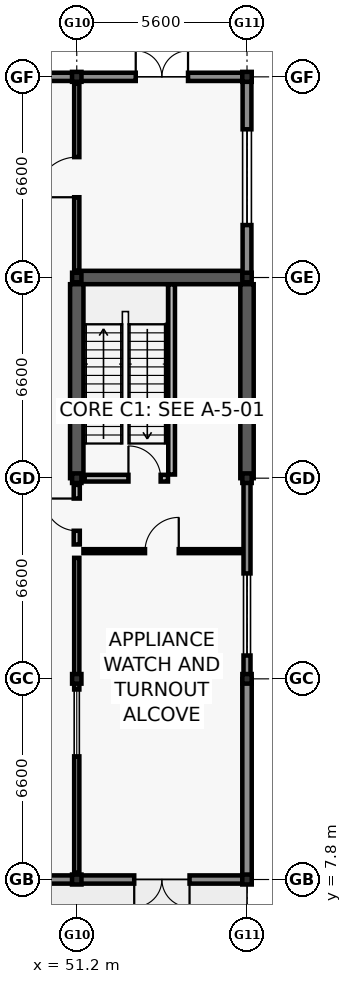
"""IFC4 building model, lengths in metres.
Left out: names, types, materials, properties, quantities, classifications, styles, units other than length and angle.
Written with IfcOpenShell. Run it as: python <this file> out.ifc"""

import sys

from ifc_helpers import new_model, si_unit, direction, frame, frame_2d, origin, origin_2d, place, context, subcontext, project, spatial, rectangle, i_section, extrude, element, fill, save


model = new_model("IFC4")
c1 = context("Model", 3, precision=1e-05, world=origin(), true_north=direction((0.0, 1.0)))
c2 = subcontext(c1, "Body", "Model", "MODEL_VIEW")
j1 = project(units=[si_unit("LENGTHUNIT", "METRE"), si_unit("PLANEANGLEUNIT", "RADIAN")], contexts=[c1])
p1 = place(None, origin())
s1 = spatial("IfcSite", under=j1, at=p1, CompositionType="ELEMENT")
p2 = place(p1, origin())
s2 = spatial("IfcBuilding", under=s1, at=p2, CompositionType="ELEMENT")
p3 = place(p2, origin())
s3 = spatial("IfcBuildingStorey", under=s2, at=p3, CompositionType="ELEMENT", Elevation=0.0)
p4 = place(p3, frame((51.2, 7.8, 0.0), z_axis=(0.0, 0.0, 1.0), x_axis=(1.0, 0.0, 0.0)))
e1 = element("IfcColumn", 1, at=p4, inside=s3, PredefinedType="COLUMN", context=c2, shape_type="SweptSolid", body=[
    extrude(i_section(OverallWidth=0.311, OverallDepth=0.327, WebThickness=0.016, FlangeThickness=0.025, FilletRadius=0.017, at=origin_2d()), origin(), (0.0, 0.0, 1.0), 5.4),
])
for number, where, z_axis, x_axis in (
    (2, (51.2, 14.4, 0.0), (0.0, 0.0, 1.0), (1.0, 0.0, 0.0)),
    (3, (51.2, 21.0, 0.0), (0.0, 0.0, 1.0), (1.0, 0.0, 0.0)),
    (4, (51.2, 27.6, 0.0), (0.0, 0.0, 1.0), (1.0, 0.0, 0.0)),
):
    element("IfcColumn", number, at=place(p3, frame(where, z_axis=z_axis, x_axis=x_axis)), inside=s3, PredefinedType="COLUMN", context=c2, shape_type="SweptSolid", body=[
        extrude(i_section(OverallWidth=0.307, OverallDepth=0.315, WebThickness=0.012, FlangeThickness=0.019, FilletRadius=0.017, at=origin_2d()), origin(), (0.0, 0.0, 1.0), 5.4),
    ])
for number, where, z_axis, x_axis in (
    (5, (51.2, 34.2, 0.0), (0.0, 0.0, 1.0), (1.0, 0.0, 0.0)),
    (6, (56.8, 7.8, 0.0), (0.0, 0.0, 1.0), (1.0, 0.0, 0.0)),
):
    element("IfcColumn", number, at=place(p3, frame(where, z_axis=z_axis, x_axis=x_axis)), inside=s3, PredefinedType="COLUMN", context=c2, shape_type="SweptSolid", body=[
        extrude(i_section(OverallWidth=0.311, OverallDepth=0.327, WebThickness=0.016, FlangeThickness=0.025, FilletRadius=0.017, at=origin_2d()), origin(), (0.0, 0.0, 1.0), 5.4),
    ])
for number, where, z_axis, x_axis in (
    (7, (56.8, 14.4, 0.0), (0.0, 0.0, 1.0), (1.0, 0.0, 0.0)),
    (8, (56.8, 21.0, 0.0), (0.0, 0.0, 1.0), (1.0, 0.0, 0.0)),
    (9, (56.8, 27.6, 0.0), (0.0, 0.0, 1.0), (1.0, 0.0, 0.0)),
):
    element("IfcColumn", number, at=place(p3, frame(where, z_axis=z_axis, x_axis=x_axis)), inside=s3, PredefinedType="COLUMN", context=c2, shape_type="SweptSolid", body=[
        extrude(i_section(OverallWidth=0.307, OverallDepth=0.315, WebThickness=0.012, FlangeThickness=0.019, FilletRadius=0.017, at=origin_2d()), origin(), (0.0, 0.0, 1.0), 5.4),
    ])
p5 = place(p3, frame((56.8, 34.2, 0.0), z_axis=(0.0, 0.0, 1.0), x_axis=(1.0, 0.0, 0.0)))
e10 = element("IfcColumn", 10, at=p5, inside=s3, PredefinedType="COLUMN", context=c2, shape_type="SweptSolid", body=[
    extrude(i_section(OverallWidth=0.311, OverallDepth=0.327, WebThickness=0.016, FlangeThickness=0.025, FilletRadius=0.017, at=origin_2d()), origin(), (0.0, 0.0, 1.0), 5.4),
])
p6 = place(p3, frame((51.2, 27.6, 0.0), z_axis=(0.0, 0.0, 1.0), x_axis=(1.0, 0.0, 0.0)))
e11 = element("IfcWall", 11, at=p6, inside=s3, PredefinedType="SHEAR", context=c2, shape_type="SweptSolid", body=[
    extrude(rectangle(XDim=5.6, YDim=0.44, at=frame_2d((2.8, 0.0))), origin(), (0.0, 0.0, 1.0), 5.16),
])
for number, where, z_axis, x_axis in (
    (12, (51.2, 21.0, 0.0), (0.0, 0.0, 1.0), (0.0, 1.0, 0.0)),
    (13, (56.8, 21.0, 0.0), (0.0, 0.0, 1.0), (0.0, 1.0, 0.0)),
):
    element("IfcWall", number, at=place(p3, frame(where, z_axis=z_axis, x_axis=x_axis)), inside=s3, PredefinedType="SHEAR", context=c2, shape_type="SweptSolid", body=[
        extrude(rectangle(XDim=6.38, YDim=0.44, at=frame_2d((3.19, 0.0))), origin(), (0.0, 0.0, 1.0), 5.16),
    ])
p7 = place(p3, frame((51.195, 7.8, 0.0), z_axis=(0.0, 0.0, 1.0), x_axis=(-1.0, 0.0, 0.0)))
e14 = element("IfcWall", 14, at=p7, inside=s3, PredefinedType="SOLIDWALL", context=c2, shape_type="SweptSolid", body=[
    extrude(rectangle(XDim=5.59, YDim=0.27, at=frame_2d((2.795, 0.0))), origin(), (0.0, 0.0, 1.0), 4.3),
])
p8 = place(p7, frame((0.92, 0.0, 0.0)))
e15 = element("IfcOpeningElement", 15, at=p8, cuts=e14, PredefinedType="OPENING", context=c2, shape_type="SweptSolid", body=[
    extrude(rectangle(XDim=3.75, YDim=4.15, at=frame_2d((1.875, 2.075))), frame((0.0, 0.145, 0.0), z_axis=(0.0, -1.0, 0.0), x_axis=(1.0, 0.0, 0.0)), (0.0, 0.0, 1.0), 0.29),
])
p9 = place(p3, frame((56.795, 7.8, 0.0), z_axis=(0.0, 0.0, 1.0), x_axis=(-1.0, 0.0, 0.0)))
e16 = element("IfcWall", 16, at=p9, inside=s3, PredefinedType="SOLIDWALL", context=c2, shape_type="SweptSolid", body=[
    extrude(rectangle(XDim=5.59, YDim=0.27, at=frame_2d((2.795, 0.0))), origin(), (0.0, 0.0, 1.0), 4.52),
])
p10 = place(p9, frame((1.885, 0.0, 0.0)))
e17 = element("IfcOpeningElement", 17, at=p10, cuts=e16, PredefinedType="OPENING", context=c2, shape_type="SweptSolid", body=[
    extrude(rectangle(XDim=1.82, YDim=2.2, at=frame_2d((0.91, 1.1))), frame((0.0, 0.145, 0.0), z_axis=(0.0, -1.0, 0.0), x_axis=(1.0, 0.0, 0.0)), (0.0, 0.0, 1.0), 0.29),
])
p11 = place(p3, frame((45.605, 34.2, 0.0), z_axis=(0.0, 0.0, 1.0), x_axis=(1.0, 0.0, 0.0)))
e18 = element("IfcWall", 18, at=p11, inside=s3, PredefinedType="SOLIDWALL", context=c2, shape_type="SweptSolid", body=[
    extrude(rectangle(XDim=5.59, YDim=0.27, at=frame_2d((2.795, 0.0))), origin(), (0.0, 0.0, 1.0), 4.3),
])
p12 = place(p3, frame((51.205, 34.2, 0.0), z_axis=(0.0, 0.0, 1.0), x_axis=(1.0, 0.0, 0.0)))
e19 = element("IfcWall", 19, at=p12, inside=s3, PredefinedType="SOLIDWALL", context=c2, shape_type="SweptSolid", body=[
    extrude(rectangle(XDim=5.59, YDim=0.27, at=frame_2d((2.795, 0.0))), origin(), (0.0, 0.0, 1.0), 4.52),
])
p13 = place(p12, frame((1.935, 0.0, 0.0)))
e20 = element("IfcOpeningElement", 20, at=p13, cuts=e19, PredefinedType="OPENING", context=c2, shape_type="SweptSolid", body=[
    extrude(rectangle(XDim=1.72, YDim=2.2, at=frame_2d((0.86, 1.1))), frame((0.0, 0.145, 0.0), z_axis=(0.0, -1.0, 0.0), x_axis=(1.0, 0.0, 0.0)), (0.0, 0.0, 1.0), 0.29),
])
p14 = place(p3, frame((56.8, 14.395, 0.0), z_axis=(0.0, 0.0, 1.0), x_axis=(0.0, -1.0, 0.0)))
e21 = element("IfcWall", 21, at=p14, inside=s3, PredefinedType="SOLIDWALL", context=c2, shape_type="SweptSolid", body=[
    extrude(rectangle(XDim=6.59, YDim=0.31, at=frame_2d((3.295, 0.0))), origin(), (0.0, 0.0, 1.0), 4.52),
])
p15 = place(p3, frame((56.8, 20.995, 0.0), z_axis=(0.0, 0.0, 1.0), x_axis=(0.0, -1.0, 0.0)))
e22 = element("IfcWall", 22, at=p15, inside=s3, PredefinedType="SOLIDWALL", context=c2, shape_type="SweptSolid", body=[
    extrude(rectangle(XDim=6.59, YDim=0.23, at=frame_2d((3.295, 0.0))), origin(), (0.0, 0.0, 1.0), 4.52),
])
p16 = place(p15, frame((3.127, 0.0, 0.8)))
e23 = element("IfcOpeningElement", 23, at=p16, cuts=e22, PredefinedType="OPENING", context=c2, shape_type="SweptSolid", body=[
    extrude(rectangle(XDim=2.7, YDim=2.1, at=frame_2d((1.35, 1.05))), frame((0.0, 0.125, 0.0), z_axis=(0.0, -1.0, 0.0), x_axis=(1.0, 0.0, 0.0)), (0.0, 0.0, 1.0), 0.25),
])
p17 = place(p3, frame((56.8, 34.195, 0.0), z_axis=(0.0, 0.0, 1.0), x_axis=(0.0, -1.0, 0.0)))
e24 = element("IfcWall", 24, at=p17, inside=s3, PredefinedType="SOLIDWALL", context=c2, shape_type="SweptSolid", body=[
    extrude(rectangle(XDim=6.59, YDim=0.29, at=frame_2d((3.295, 0.0))), origin(), (0.0, 0.0, 1.0), 4.52),
])
p18 = place(p17, frame((1.72, 0.0, 0.8)))
e25 = element("IfcOpeningElement", 25, at=p18, cuts=e24, PredefinedType="OPENING", context=c2, shape_type="SweptSolid", body=[
    extrude(rectangle(XDim=3.15, YDim=2.1, at=frame_2d((1.575, 1.05))), frame((0.0, 0.155, 0.0), z_axis=(0.0, -1.0, 0.0), x_axis=(1.0, 0.0, 0.0)), (0.0, 0.0, 1.0), 0.31),
])
p19 = place(p3, frame((54.32, 21.12, 0.0), z_axis=(0.0, 0.0, 1.0), x_axis=(0.0, 1.0, 0.0)))
e26 = element("IfcWall", 26, at=p19, inside=s3, PredefinedType="SOLIDWALL", context=c2, shape_type="SweptSolid", body=[
    extrude(rectangle(XDim=6.255, YDim=0.22, at=frame_2d((3.127, 0.0))), origin(), (0.0, 0.0, 1.0), 5.16),
])
p20 = place(p3, frame((51.46, 21.0, 0.0), z_axis=(0.0, 0.0, 1.0), x_axis=(1.0, 0.0, 0.0)))
e27 = element("IfcWall", 27, at=p20, inside=s3, PredefinedType="SOLIDWALL", context=c2, shape_type="SweptSolid", body=[
    extrude(rectangle(XDim=2.74, YDim=0.22, at=frame_2d((1.37, 0.0))), origin(), (0.0, 0.0, 1.0), 4.52),
])
p21 = place(p20, frame((1.44, 0.0, 0.0)))
e28 = element("IfcOpeningElement", 28, at=p21, cuts=e27, PredefinedType="OPENING", context=c2, shape_type="SweptSolid", body=[
    extrude(rectangle(XDim=1.06, YDim=2.1, at=frame_2d((0.53, 1.05))), frame((0.0, 0.12, 0.0), z_axis=(0.0, -1.0, 0.0), x_axis=(1.0, 0.0, 0.0)), (0.0, 0.0, 1.0), 0.24),
])
p22 = place(p3, frame((51.2, 8.02, 0.0), z_axis=(0.0, 0.0, 1.0), x_axis=(0.0, 1.0, 0.0)))
e29 = element("IfcWall", 29, at=p22, inside=s3, PredefinedType="PARTITIONING", context=c2, shape_type="SweptSolid", body=[
    extrude(rectangle(XDim=10.36, YDim=0.17, at=frame_2d((5.18, 0.0))), origin(), (0.0, 0.0, 1.0), 4.5),
])
p23 = place(p22, frame((3.83, 0.0, 0.95)))
e30 = element("IfcOpeningElement", 30, at=p23, cuts=e29, PredefinedType="OPENING", context=c2, shape_type="SweptSolid", body=[
    extrude(rectangle(XDim=2.2, YDim=1.3, at=frame_2d((1.1, 0.65))), frame((0.0, 0.095, 0.0), z_axis=(0.0, -1.0, 0.0), x_axis=(1.0, 0.0, 0.0)), (0.0, 0.0, 1.0), 0.19),
])
p24 = place(p3, frame((51.2, 18.82, 0.0), z_axis=(0.0, 0.0, 1.0), x_axis=(0.0, 1.0, 0.0)))
e31 = element("IfcWall", 31, at=p24, inside=s3, PredefinedType="PARTITIONING", context=c2, shape_type="SweptSolid", body=[
    extrude(rectangle(XDim=1.96, YDim=0.2, at=frame_2d((0.98, 0.0))), origin(), (0.0, 0.0, 1.0), 4.5),
])
p25 = place(p24, frame((0.45, 0.0, 0.0)))
e32 = element("IfcOpeningElement", 32, at=p25, cuts=e31, PredefinedType="OPENING", context=c2, shape_type="SweptSolid", body=[
    extrude(rectangle(XDim=1.06, YDim=2.1, at=frame_2d((0.53, 1.05))), frame((0.0, 0.11, 0.0), z_axis=(0.0, -1.0, 0.0), x_axis=(1.0, 0.0, 0.0)), (0.0, 0.0, 1.0), 0.22),
])
p26 = place(p3, frame((51.2, 27.82, 0.0), z_axis=(0.0, 0.0, 1.0), x_axis=(0.0, 1.0, 0.0)))
e33 = element("IfcWall", 33, at=p26, inside=s3, PredefinedType="PARTITIONING", context=c2, shape_type="SweptSolid", body=[
    extrude(rectangle(XDim=6.16, YDim=0.17, at=frame_2d((3.08, 0.0))), origin(), (0.0, 0.0, 1.0), 4.5),
])
p27 = place(p26, frame((2.42, 0.0, 0.0)))
e34 = element("IfcOpeningElement", 34, at=p27, cuts=e33, PredefinedType="OPENING", context=c2, shape_type="SweptSolid", body=[
    extrude(rectangle(XDim=1.32, YDim=2.12, at=frame_2d((0.66, 1.06))), frame((0.0, 0.095, 0.0), z_axis=(0.0, -1.0, 0.0), x_axis=(1.0, 0.0, 0.0)), (0.0, 0.0, 1.0), 0.19),
])
p28 = place(p3, frame((51.42, 18.6, 0.0), z_axis=(0.0, 0.0, 1.0), x_axis=(1.0, 0.0, 0.0)))
e35 = element("IfcWall", 35, at=p28, inside=s3, PredefinedType="PARTITIONING", context=c2, shape_type="SweptSolid", body=[
    extrude(rectangle(XDim=5.16, YDim=0.13, at=frame_2d((2.58, 0.0))), origin(), (0.0, 0.0, 1.0), 4.5),
])
p29 = place(p28, frame((2.025, 0.0, 0.0)))
e36 = element("IfcOpeningElement", 36, at=p29, cuts=e35, PredefinedType="OPENING", context=c2, shape_type="SweptSolid", body=[
    extrude(rectangle(XDim=1.11, YDim=2.1, at=frame_2d((0.555, 1.05))), frame((0.0, 0.075, 0.0), z_axis=(0.0, -1.0, 0.0), x_axis=(1.0, 0.0, 0.0)), (0.0, 0.0, 1.0), 0.15),
])
p30 = place(p10, origin())
e37 = element("IfcDoor", 37, at=p30, inside=s3, OperationType="DOUBLE_DOOR_SINGLE_SWING", PredefinedType="DOOR", context=c2, shape_type="SweptSolid", body=[
    extrude(rectangle(XDim=1.82, YDim=2.2, at=frame_2d((0.91, 1.1))), frame((0.0, 0.025, 0.0), z_axis=(0.0, -1.0, 0.0), x_axis=(1.0, 0.0, 0.0)), (0.0, 0.0, 1.0), 0.05),
])
fill(e17, e37)
p31 = place(p13, origin())
e38 = element("IfcDoor", 38, at=p31, inside=s3, OperationType="DOUBLE_DOOR_SINGLE_SWING", PredefinedType="DOOR", context=c2, shape_type="SweptSolid", body=[
    extrude(rectangle(XDim=1.72, YDim=2.2, at=frame_2d((0.86, 1.1))), frame((0.0, 0.025, 0.0), z_axis=(0.0, -1.0, 0.0), x_axis=(1.0, 0.0, 0.0)), (0.0, 0.0, 1.0), 0.05),
])
fill(e20, e38)
p32 = place(p16, origin())
e39 = element("IfcWindow", 39, at=p32, inside=s3, PartitioningType="TRIPLE_PANEL_VERTICAL", PredefinedType="WINDOW", context=c2, shape_type="SweptSolid", body=[
    extrude(rectangle(XDim=2.7, YDim=2.1, at=frame_2d((1.35, 1.05))), frame((0.0, 0.03, 0.0), z_axis=(0.0, -1.0, 0.0), x_axis=(1.0, 0.0, 0.0)), (0.0, 0.0, 1.0), 0.06),
])
fill(e23, e39)
p33 = place(p18, origin())
e40 = element("IfcWindow", 40, at=p33, inside=s3, PartitioningType="TRIPLE_PANEL_VERTICAL", PredefinedType="WINDOW", context=c2, shape_type="SweptSolid", body=[
    extrude(rectangle(XDim=3.15, YDim=2.1, at=frame_2d((1.575, 1.05))), frame((0.0, 0.03, 0.0), z_axis=(0.0, -1.0, 0.0), x_axis=(1.0, 0.0, 0.0)), (0.0, 0.0, 1.0), 0.06),
])
fill(e25, e40)
p34 = place(p21, origin())
e41 = element("IfcDoor", 41, at=p34, inside=s3, OperationType="SINGLE_SWING_LEFT", PredefinedType="DOOR", context=c2, shape_type="SweptSolid", body=[
    extrude(rectangle(XDim=1.06, YDim=2.1, at=frame_2d((0.53, 1.05))), frame((0.0, 0.025, 0.0), z_axis=(0.0, -1.0, 0.0), x_axis=(1.0, 0.0, 0.0)), (0.0, 0.0, 1.0), 0.05),
])
fill(e28, e41)
p35 = place(p23, origin())
e42 = element("IfcWindow", 42, at=p35, inside=s3, PartitioningType="DOUBLE_PANEL_VERTICAL", PredefinedType="WINDOW", context=c2, shape_type="SweptSolid", body=[
    extrude(rectangle(XDim=2.2, YDim=1.3, at=frame_2d((1.1, 0.65))), frame((0.0, 0.03, 0.0), z_axis=(0.0, -1.0, 0.0), x_axis=(1.0, 0.0, 0.0)), (0.0, 0.0, 1.0), 0.06),
])
fill(e30, e42)
p36 = place(p25, origin())
e43 = element("IfcDoor", 43, at=p36, inside=s3, OperationType="SINGLE_SWING_RIGHT", PredefinedType="DOOR", context=c2, shape_type="SweptSolid", body=[
    extrude(rectangle(XDim=1.06, YDim=2.1, at=frame_2d((0.53, 1.05))), frame((0.0, 0.025, 0.0), z_axis=(0.0, -1.0, 0.0), x_axis=(1.0, 0.0, 0.0)), (0.0, 0.0, 1.0), 0.05),
])
fill(e32, e43)
p37 = place(p27, origin())
e44 = element("IfcDoor", 44, at=p37, inside=s3, OperationType="SINGLE_SWING_LEFT", PredefinedType="DOOR", context=c2, shape_type="SweptSolid", body=[
    extrude(rectangle(XDim=1.32, YDim=2.12, at=frame_2d((0.66, 1.06))), frame((0.0, 0.025, 0.0), z_axis=(0.0, -1.0, 0.0), x_axis=(1.0, 0.0, 0.0)), (0.0, 0.0, 1.0), 0.05),
])
fill(e34, e44)
p38 = place(p29, origin())
e45 = element("IfcDoor", 45, at=p38, inside=s3, OperationType="SINGLE_SWING_RIGHT", PredefinedType="DOOR", context=c2, shape_type="SweptSolid", body=[
    extrude(rectangle(XDim=1.11, YDim=2.1, at=frame_2d((0.555, 1.05))), frame((0.0, 0.025, 0.0), z_axis=(0.0, -1.0, 0.0), x_axis=(1.0, 0.0, 0.0)), (0.0, 0.0, 1.0), 0.05),
])
fill(e36, e45)
save(model, sys.argv[1])
